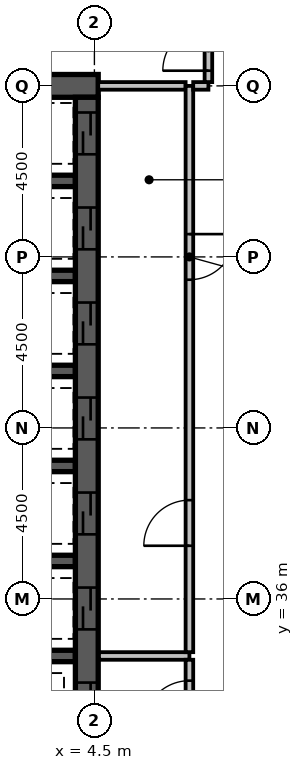
"""IFC4 building model, lengths in metres.
Left out: names, types, materials, properties, quantities, classifications, styles, units other than length and angle.
Written with IfcOpenShell. Run it as: python <this file> out.ifc"""

import sys

from ifc_helpers import new_model, si_unit, direction, frame, frame_2d, origin, place, context, subcontext, project, spatial, rectangle, extrude, element, fill, save


model = new_model("IFC4")
c1 = context("Model", 3, precision=1e-05, world=origin(), true_north=direction((0.0, 1.0)))
c2 = subcontext(c1, "Body", "Model", "MODEL_VIEW")
j1 = project(units=[si_unit("LENGTHUNIT", "METRE"), si_unit("PLANEANGLEUNIT", "RADIAN")], contexts=[c1])
p1 = place(None, origin())
s1 = spatial("IfcSite", under=j1, at=p1, CompositionType="ELEMENT")
p2 = place(p1, origin())
s2 = spatial("IfcBuilding", under=s1, at=p2, CompositionType="ELEMENT")
p3 = place(p2, frame((0.0, 0.0, 159.2)))
s3 = spatial("IfcBuildingStorey", under=s2, at=p3, CompositionType="ELEMENT", Elevation=159.2)
p4 = place(p3, frame((0.2, 49.5, -0.3), z_axis=(0.0, 0.0, 1.0), x_axis=(1.0, 0.0, 0.0)))
e1 = element("IfcWall", 1, at=p4, inside=s3, PredefinedType="SHEAR", context=c2, shape_type="SweptSolid", body=[
    extrude(rectangle(XDim=4.4, YDim=0.6, at=frame_2d((2.2, 0.0))), origin(), (0.0, 0.0, 1.0), 3.6),
])
for number, where, z_axis, x_axis in (
    (2, (0.8, 34.5, -0.3), (0.0, 0.0, 1.0), (1.0, 0.0, 0.0)),
    (3, (0.8, 37.0, -0.3), (0.0, 0.0, 1.0), (1.0, 0.0, 0.0)),
    (4, (0.8, 39.5, -0.3), (0.0, 0.0, 1.0), (1.0, 0.0, 0.0)),
    (5, (0.8, 42.0, -0.3), (0.0, 0.0, 1.0), (1.0, 0.0, 0.0)),
    (6, (0.8, 44.5, -0.3), (0.0, 0.0, 1.0), (1.0, 0.0, 0.0)),
    (7, (0.8, 47.0, -0.3), (0.0, 0.0, 1.0), (1.0, 0.0, 0.0)),
):
    element("IfcWall", number, at=place(p3, frame(where, z_axis=z_axis, x_axis=x_axis)), inside=s3, PredefinedType="SHEAR", context=c2, shape_type="SweptSolid", body=[
        extrude(rectangle(XDim=3.2, YDim=0.3, at=frame_2d((1.6, 0.0))), origin(), (0.0, 0.0, 1.0), 3.6),
    ])
p5 = place(p3, frame((4.3, 27.15, -0.3), z_axis=(0.0, 0.0, 1.0), x_axis=(0.0, 1.0, 0.0)))
e8 = element("IfcWall", 8, at=p5, inside=s3, PredefinedType="SHEAR", context=c2, shape_type="SweptSolid", body=[
    extrude(rectangle(XDim=22.05, YDim=0.6, at=frame_2d((11.025, 0.0))), origin(), (0.0, 0.0, 1.0), 3.6),
])
p6 = place(p5, frame((3.05, 0.0, 0.3)))
e9 = element("IfcOpeningElement", 9, at=p6, cuts=e8, PredefinedType="OPENING", context=c2, shape_type="SweptSolid", body=[
    extrude(rectangle(XDim=1.1, YDim=2.1, at=frame_2d((0.55, 1.05))), frame((0.0, 0.312, 0.0), z_axis=(0.0, -1.0, 0.0), x_axis=(1.0, 0.0, 0.0)), (0.0, 0.0, 1.0), 0.624),
])
p7 = place(p5, frame((0.55, 0.0, 0.3)))
e10 = element("IfcOpeningElement", 10, at=p7, cuts=e8, PredefinedType="OPENING", context=c2, shape_type="SweptSolid", body=[
    extrude(rectangle(XDim=1.1, YDim=2.1, at=frame_2d((0.55, 1.05))), frame((0.0, 0.312, 0.0), z_axis=(0.0, -1.0, 0.0), x_axis=(1.0, 0.0, 0.0)), (0.0, 0.0, 1.0), 0.624),
])
p8 = place(p5, frame((20.55, 0.0, 0.3)))
e11 = element("IfcOpeningElement", 11, at=p8, cuts=e8, PredefinedType="OPENING", context=c2, shape_type="SweptSolid", body=[
    extrude(rectangle(XDim=1.1, YDim=2.1, at=frame_2d((0.55, 1.05))), frame((0.0, 0.312, 0.0), z_axis=(0.0, -1.0, 0.0), x_axis=(1.0, 0.0, 0.0)), (0.0, 0.0, 1.0), 0.624),
])
p9 = place(p5, frame((18.05, 0.0, 0.3)))
e12 = element("IfcOpeningElement", 12, at=p9, cuts=e8, PredefinedType="OPENING", context=c2, shape_type="SweptSolid", body=[
    extrude(rectangle(XDim=1.1, YDim=2.1, at=frame_2d((0.55, 1.05))), frame((0.0, 0.312, 0.0), z_axis=(0.0, -1.0, 0.0), x_axis=(1.0, 0.0, 0.0)), (0.0, 0.0, 1.0), 0.624),
])
p10 = place(p5, frame((15.55, 0.0, 0.3)))
e13 = element("IfcOpeningElement", 13, at=p10, cuts=e8, PredefinedType="OPENING", context=c2, shape_type="SweptSolid", body=[
    extrude(rectangle(XDim=1.1, YDim=2.1, at=frame_2d((0.55, 1.05))), frame((0.0, 0.312, 0.0), z_axis=(0.0, -1.0, 0.0), x_axis=(1.0, 0.0, 0.0)), (0.0, 0.0, 1.0), 0.624),
])
p11 = place(p5, frame((13.05, 0.0, 0.3)))
e14 = element("IfcOpeningElement", 14, at=p11, cuts=e8, PredefinedType="OPENING", context=c2, shape_type="SweptSolid", body=[
    extrude(rectangle(XDim=1.1, YDim=2.1, at=frame_2d((0.55, 1.05))), frame((0.0, 0.312, 0.0), z_axis=(0.0, -1.0, 0.0), x_axis=(1.0, 0.0, 0.0)), (0.0, 0.0, 1.0), 0.624),
])
p12 = place(p5, frame((10.55, 0.0, 0.3)))
e15 = element("IfcOpeningElement", 15, at=p12, cuts=e8, PredefinedType="OPENING", context=c2, shape_type="SweptSolid", body=[
    extrude(rectangle(XDim=1.1, YDim=2.1, at=frame_2d((0.55, 1.05))), frame((0.0, 0.312, 0.0), z_axis=(0.0, -1.0, 0.0), x_axis=(1.0, 0.0, 0.0)), (0.0, 0.0, 1.0), 0.624),
])
p13 = place(p5, frame((8.05, 0.0, 0.3)))
e16 = element("IfcOpeningElement", 16, at=p13, cuts=e8, PredefinedType="OPENING", context=c2, shape_type="SweptSolid", body=[
    extrude(rectangle(XDim=1.1, YDim=2.1, at=frame_2d((0.55, 1.05))), frame((0.0, 0.312, 0.0), z_axis=(0.0, -1.0, 0.0), x_axis=(1.0, 0.0, 0.0)), (0.0, 0.0, 1.0), 0.624),
])
p14 = place(p5, frame((5.55, 0.0, 0.3)))
e17 = element("IfcOpeningElement", 17, at=p14, cuts=e8, PredefinedType="OPENING", context=c2, shape_type="SweptSolid", body=[
    extrude(rectangle(XDim=1.1, YDim=2.1, at=frame_2d((0.55, 1.05))), frame((0.0, 0.312, 0.0), z_axis=(0.0, -1.0, 0.0), x_axis=(1.0, 0.0, 0.0)), (0.0, 0.0, 1.0), 0.624),
])
p15 = place(p3, frame((4.62, 34.5, 0.0), z_axis=(0.0, 0.0, 1.0), x_axis=(1.0, 0.0, 0.0)))
e18 = element("IfcWall", 18, at=p15, inside=s3, PredefinedType="PARTITIONING", context=c2, shape_type="SweptSolid", body=[
    extrude(rectangle(XDim=2.38, YDim=0.2, at=frame_2d((1.19, 0.0))), origin(), (0.0, 0.0, 1.0), 3.3),
])
p16 = place(p3, frame((7.0, 34.6, 0.0), z_axis=(0.0, 0.0, 1.0), x_axis=(0.0, 1.0, 0.0)))
e19 = element("IfcWall", 19, at=p16, inside=s3, PredefinedType="PARTITIONING", context=c2, shape_type="SweptSolid", body=[
    extrude(rectangle(XDim=14.9, YDim=0.2, at=frame_2d((7.45, 0.0))), origin(), (0.0, 0.0, 1.0), 3.3),
])
p17 = place(p16, frame((2.8, 0.0, 0.0)))
e20 = element("IfcOpeningElement", 20, at=p17, cuts=e19, PredefinedType="OPENING", context=c2, shape_type="SweptSolid", body=[
    extrude(rectangle(XDim=1.2, YDim=2.1, at=frame_2d((0.6, 1.05))), frame((0.0, 0.112, 0.0), z_axis=(0.0, -1.0, 0.0), x_axis=(1.0, 0.0, 0.0)), (0.0, 0.0, 1.0), 0.224),
])
p18 = place(p16, frame((9.8, 0.0, 0.0)))
e21 = element("IfcOpeningElement", 21, at=p18, cuts=e19, PredefinedType="OPENING", context=c2, shape_type="SweptSolid", body=[
    extrude(rectangle(XDim=1.2, YDim=2.1, at=frame_2d((0.6, 1.05))), frame((0.0, 0.112, 0.0), z_axis=(0.0, -1.0, 0.0), x_axis=(1.0, 0.0, 0.0)), (0.0, 0.0, 1.0), 0.224),
])
p19 = place(p3, frame((4.6, 49.5, 0.0), z_axis=(0.0, 0.0, 1.0), x_axis=(1.0, 0.0, 0.0)))
e22 = element("IfcWall", 22, at=p19, inside=s3, PredefinedType="PARTITIONING", context=c2, shape_type="SweptSolid", body=[
    extrude(rectangle(XDim=2.3, YDim=0.2, at=frame_2d((1.15, 0.0))), origin(), (0.0, 0.0, 1.0), 3.3),
])
p20 = place(p3, frame((7.0, 32.1, 0.0), z_axis=(0.0, 0.0, 1.0), x_axis=(0.0, 1.0, 0.0)))
e23 = element("IfcWall", 23, at=p20, inside=s3, PredefinedType="PARTITIONING", context=c2, shape_type="SweptSolid", body=[
    extrude(rectangle(XDim=2.3, YDim=0.2, at=frame_2d((1.15, 0.0))), origin(), (0.0, 0.0, 1.0), 3.3),
])
p21 = place(p20, frame((0.55, 0.0, 0.0)))
e24 = element("IfcOpeningElement", 24, at=p21, cuts=e23, PredefinedType="OPENING", context=c2, shape_type="SweptSolid", body=[
    extrude(rectangle(XDim=1.2, YDim=2.1, at=frame_2d((0.6, 1.05))), frame((0.0, 0.112, 0.0), z_axis=(0.0, -1.0, 0.0), x_axis=(1.0, 0.0, 0.0)), (0.0, 0.0, 1.0), 0.224),
])
p22 = place(p3, frame((7.1, 49.5, 0.0), z_axis=(0.0, 0.0, 1.0), x_axis=(1.0, 0.0, 0.0)))
e25 = element("IfcWall", 25, at=p22, inside=s3, PredefinedType="PARTITIONING", context=c2, shape_type="SweptSolid", body=[
    extrude(rectangle(XDim=0.4, YDim=0.2, at=frame_2d((0.2, 0.0))), origin(), (0.0, 0.0, 1.0), 3.3),
])
p23 = place(p3, frame((7.5, 49.6, 0.0), z_axis=(0.0, 0.0, 1.0), x_axis=(0.0, 1.0, 0.0)))
e26 = element("IfcWall", 26, at=p23, inside=s3, PredefinedType="PARTITIONING", context=c2, shape_type="SweptSolid", body=[
    extrude(rectangle(XDim=3.9, YDim=0.2, at=frame_2d((1.95, 0.0))), origin(), (0.0, 0.0, 1.0), 3.3),
])
p24 = place(p23, frame((0.3, 0.0, 0.0)))
e27 = element("IfcOpeningElement", 27, at=p24, cuts=e26, PredefinedType="OPENING", context=c2, shape_type="SweptSolid", body=[
    extrude(rectangle(XDim=1.2, YDim=2.1, at=frame_2d((0.6, 1.05))), frame((0.0, 0.112, 0.0), z_axis=(0.0, -1.0, 0.0), x_axis=(1.0, 0.0, 0.0)), (0.0, 0.0, 1.0), 0.224),
])
p25 = place(p24, origin())
e28 = element("IfcDoor", 28, at=p25, inside=s3, OperationType="SINGLE_SWING_LEFT", PredefinedType="DOOR", context=c2, shape_type="SweptSolid", body=[
    extrude(rectangle(XDim=1.2, YDim=2.1, at=frame_2d((0.6, 1.05))), frame((0.0, 0.025, 0.0), z_axis=(0.0, -1.0, 0.0), x_axis=(1.0, 0.0, 0.0)), (0.0, 0.0, 1.0), 0.05),
])
fill(e27, e28)
p26 = place(p8, origin())
e29 = element("IfcDoor", 29, at=p26, inside=s3, OperationType="SLIDING_TO_LEFT", PredefinedType="DOOR", context=c2, shape_type="SweptSolid", body=[
    extrude(rectangle(XDim=1.1, YDim=2.1, at=frame_2d((0.55, 1.05))), frame((0.0, 0.025, 0.0), z_axis=(0.0, -1.0, 0.0), x_axis=(1.0, 0.0, 0.0)), (0.0, 0.0, 1.0), 0.05),
])
fill(e11, e29)
p27 = place(p9, origin())
e30 = element("IfcDoor", 30, at=p27, inside=s3, OperationType="SLIDING_TO_LEFT", PredefinedType="DOOR", context=c2, shape_type="SweptSolid", body=[
    extrude(rectangle(XDim=1.1, YDim=2.1, at=frame_2d((0.55, 1.05))), frame((0.0, 0.025, 0.0), z_axis=(0.0, -1.0, 0.0), x_axis=(1.0, 0.0, 0.0)), (0.0, 0.0, 1.0), 0.05),
])
fill(e12, e30)
p28 = place(p10, origin())
e31 = element("IfcDoor", 31, at=p28, inside=s3, OperationType="SLIDING_TO_LEFT", PredefinedType="DOOR", context=c2, shape_type="SweptSolid", body=[
    extrude(rectangle(XDim=1.1, YDim=2.1, at=frame_2d((0.55, 1.05))), frame((0.0, 0.025, 0.0), z_axis=(0.0, -1.0, 0.0), x_axis=(1.0, 0.0, 0.0)), (0.0, 0.0, 1.0), 0.05),
])
fill(e13, e31)
p29 = place(p11, origin())
e32 = element("IfcDoor", 32, at=p29, inside=s3, OperationType="SLIDING_TO_LEFT", PredefinedType="DOOR", context=c2, shape_type="SweptSolid", body=[
    extrude(rectangle(XDim=1.1, YDim=2.1, at=frame_2d((0.55, 1.05))), frame((0.0, 0.025, 0.0), z_axis=(0.0, -1.0, 0.0), x_axis=(1.0, 0.0, 0.0)), (0.0, 0.0, 1.0), 0.05),
])
fill(e14, e32)
p30 = place(p12, origin())
e33 = element("IfcDoor", 33, at=p30, inside=s3, OperationType="SLIDING_TO_LEFT", PredefinedType="DOOR", context=c2, shape_type="SweptSolid", body=[
    extrude(rectangle(XDim=1.1, YDim=2.1, at=frame_2d((0.55, 1.05))), frame((0.0, 0.025, 0.0), z_axis=(0.0, -1.0, 0.0), x_axis=(1.0, 0.0, 0.0)), (0.0, 0.0, 1.0), 0.05),
])
fill(e15, e33)
p31 = place(p13, origin())
e34 = element("IfcDoor", 34, at=p31, inside=s3, OperationType="SLIDING_TO_LEFT", PredefinedType="DOOR", context=c2, shape_type="SweptSolid", body=[
    extrude(rectangle(XDim=1.1, YDim=2.1, at=frame_2d((0.55, 1.05))), frame((0.0, 0.025, 0.0), z_axis=(0.0, -1.0, 0.0), x_axis=(1.0, 0.0, 0.0)), (0.0, 0.0, 1.0), 0.05),
])
fill(e16, e34)
p32 = place(p17, origin())
e35 = element("IfcDoor", 35, at=p32, inside=s3, OperationType="SINGLE_SWING_LEFT", PredefinedType="DOOR", context=c2, shape_type="SweptSolid", body=[
    extrude(rectangle(XDim=1.2, YDim=2.1, at=frame_2d((0.6, 1.05))), frame((0.0, 0.025, 0.0), z_axis=(0.0, -1.0, 0.0), x_axis=(1.0, 0.0, 0.0)), (0.0, 0.0, 1.0), 0.05),
])
fill(e20, e35)
p33 = place(p18, origin())
e36 = element("IfcDoor", 36, at=p33, inside=s3, OperationType="SINGLE_SWING_RIGHT", PredefinedType="DOOR", context=c2, shape_type="SweptSolid", body=[
    extrude(rectangle(XDim=1.2, YDim=2.1, at=frame_2d((0.6, 1.05))), frame((0.0, 0.025, 0.0), z_axis=(0.0, -1.0, 0.0), x_axis=(1.0, 0.0, 0.0)), (0.0, 0.0, 1.0), 0.05),
])
fill(e21, e36)
p34 = place(p21, origin())
e37 = element("IfcDoor", 37, at=p34, inside=s3, OperationType="SINGLE_SWING_LEFT", PredefinedType="DOOR", context=c2, shape_type="SweptSolid", body=[
    extrude(rectangle(XDim=1.2, YDim=2.1, at=frame_2d((0.6, 1.05))), frame((0.0, 0.025, 0.0), z_axis=(0.0, -1.0, 0.0), x_axis=(1.0, 0.0, 0.0)), (0.0, 0.0, 1.0), 0.05),
])
fill(e24, e37)
p35 = place(p14, origin())
e38 = element("IfcDoor", 38, at=p35, inside=s3, OperationType="SLIDING_TO_LEFT", PredefinedType="DOOR", context=c2, shape_type="SweptSolid", body=[
    extrude(rectangle(XDim=1.1, YDim=2.1, at=frame_2d((0.55, 1.05))), frame((0.0, 0.025, 0.0), z_axis=(0.0, -1.0, 0.0), x_axis=(1.0, 0.0, 0.0)), (0.0, 0.0, 1.0), 0.05),
])
fill(e17, e38)
save(model, sys.argv[1])
